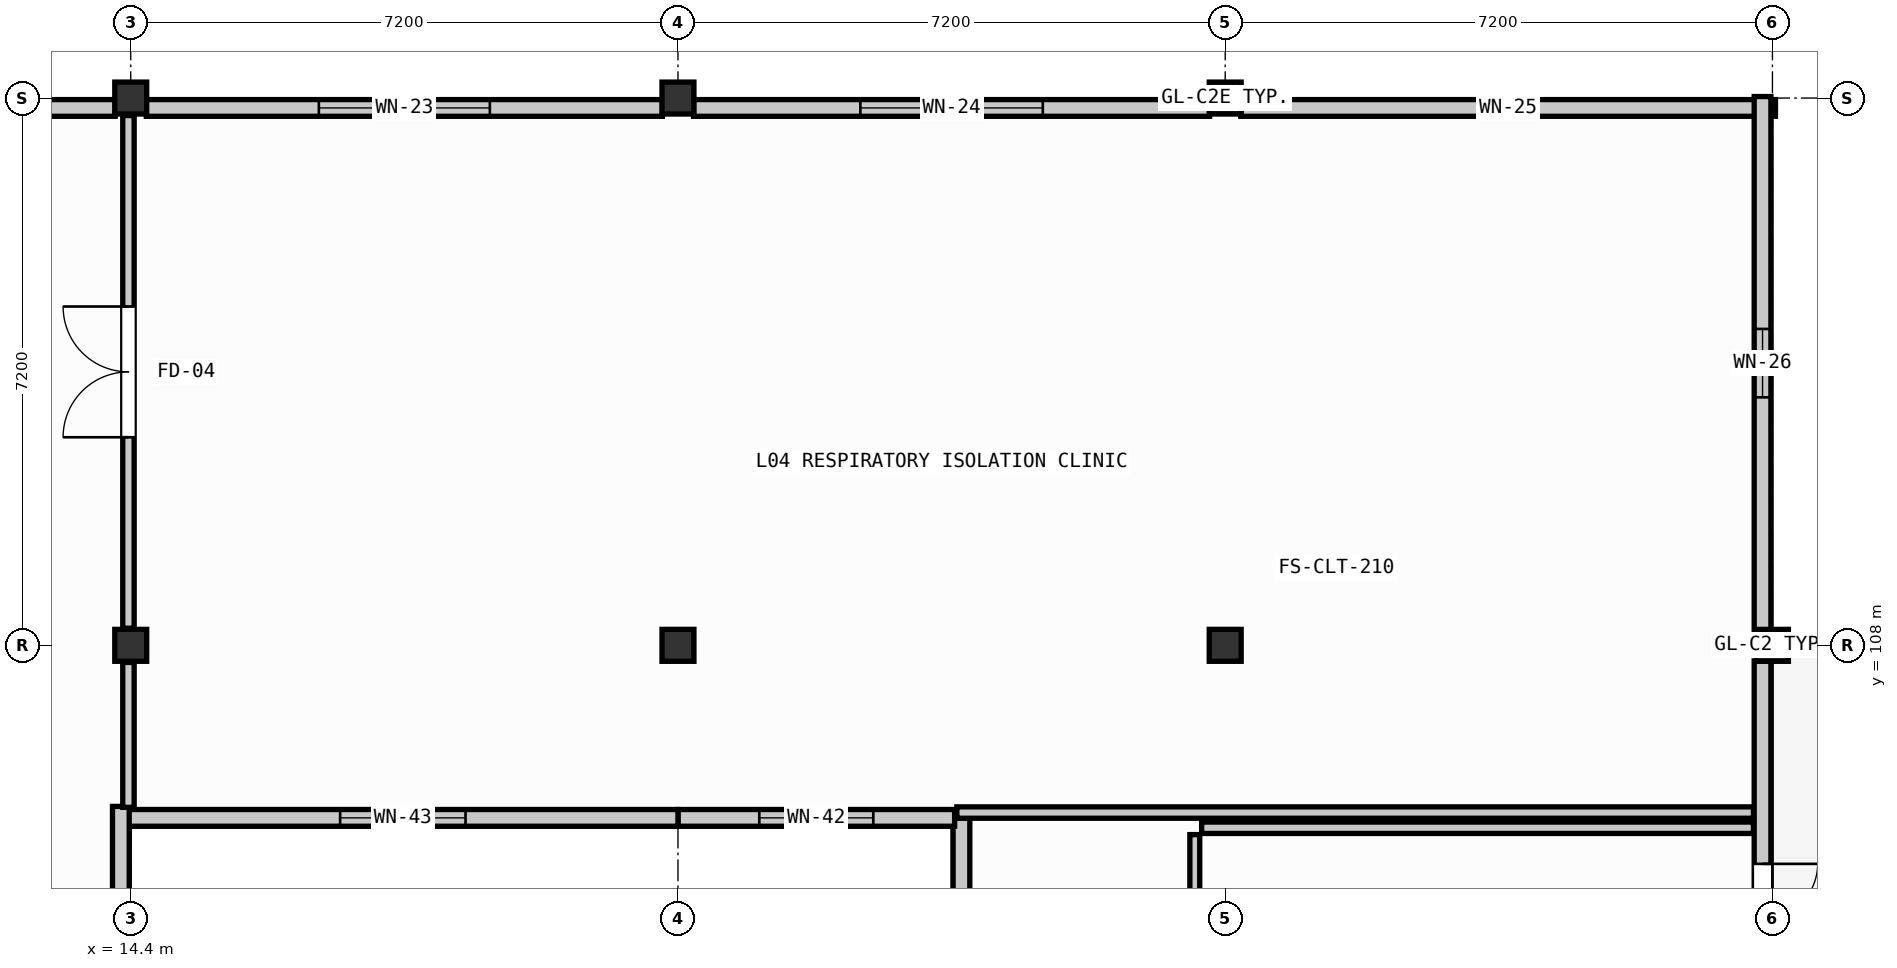
"""IFC4 building model, lengths in metres.
Left out: names, types, materials, properties, quantities, classifications, styles, units other than length and angle.
Written with IfcOpenShell. Run it as: python <this file> out.ifc"""

import sys

from ifc_helpers import new_model, si_unit, direction, frame, frame_2d, origin, origin_2d, place, context, subcontext, project, spatial, rectangle, extrude, element, fill, save


model = new_model("IFC4")
c1 = context("Model", 3, precision=1e-05, world=origin(), true_north=direction((0.0, 1.0)))
c2 = subcontext(c1, "Body", "Model", "MODEL_VIEW")
j1 = project(units=[si_unit("LENGTHUNIT", "METRE"), si_unit("PLANEANGLEUNIT", "RADIAN")], contexts=[c1])
p1 = place(None, origin())
s1 = spatial("IfcSite", under=j1, at=p1, CompositionType="ELEMENT")
p2 = place(p1, origin())
s2 = spatial("IfcBuilding", under=s1, at=p2, CompositionType="ELEMENT")
p3 = place(p2, frame((0.0, 0.0, 13.5)))
s3 = spatial("IfcBuildingStorey", under=s2, at=p3, CompositionType="ELEMENT", Elevation=13.5)
for number, where, z_axis, x_axis in (
    (1, (14.4, 108.0, 0.0), (0.0, 0.0, 1.0), (1.0, 0.0, 0.0)),
    (2, (14.4, 115.2, 0.0), (0.0, 0.0, 1.0), (1.0, 0.0, 0.0)),
    (3, (21.6, 108.0, 0.0), (0.0, 0.0, 1.0), (1.0, 0.0, 0.0)),
    (4, (21.6, 115.2, 0.0), (0.0, 0.0, 1.0), (1.0, 0.0, 0.0)),
    (5, (28.8, 108.0, 0.0), (0.0, 0.0, 1.0), (1.0, 0.0, 0.0)),
    (6, (28.8, 115.2, 0.0), (0.0, 0.0, 1.0), (1.0, 0.0, 0.0)),
):
    element("IfcColumn", number, at=place(p3, frame(where, z_axis=z_axis, x_axis=x_axis)), inside=s3, PredefinedType="COLUMN", context=c2, shape_type="SweptSolid", body=[
        extrude(rectangle(XDim=0.42, YDim=0.42, at=origin_2d()), origin(), (0.0, 0.0, 1.0), 3.99),
    ])
p4 = place(p3, frame((36.0, 108.0, 0.0), z_axis=(0.0, 0.0, 1.0), x_axis=(1.0, 0.0, 0.0)))
e7 = element("IfcColumn", 7, at=p4, inside=s3, PredefinedType="COLUMN", context=c2, shape_type="SweptSolid", body=[
    extrude(rectangle(XDim=0.42, YDim=0.42, at=origin_2d()), origin(), (0.0, 0.0, 1.0), 4.0),
])
p5 = place(p3, frame((7.405, 115.07, 0.0), z_axis=(0.0, 0.0, 1.0), x_axis=(1.0, 0.0, 0.0)))
e8 = element("IfcWall", 8, at=p5, inside=s3, PredefinedType="SOLIDWALL", context=c2, shape_type="SweptSolid", body=[
    extrude(rectangle(XDim=6.79, YDim=0.22, at=frame_2d((3.395, 0.0))), origin(), (0.0, 0.0, 1.0), 3.35),
])
p6 = place(p5, frame((2.345, 0.0, 1.5)))
e9 = element("IfcOpeningElement", 9, at=p6, cuts=e8, PredefinedType="OPENING", context=c2, shape_type="SweptSolid", body=[
    extrude(rectangle(XDim=2.1, YDim=0.95, at=frame_2d((1.05, 0.475))), frame((0.0, 0.12, 0.0), z_axis=(0.0, -1.0, 0.0), x_axis=(1.0, 0.0, 0.0)), (0.0, 0.0, 1.0), 0.24),
])
p7 = place(p3, frame((14.605, 115.07, 0.0), z_axis=(0.0, 0.0, 1.0), x_axis=(1.0, 0.0, 0.0)))
e10 = element("IfcWall", 10, at=p7, inside=s3, PredefinedType="SOLIDWALL", context=c2, shape_type="SweptSolid", body=[
    extrude(rectangle(XDim=6.79, YDim=0.22, at=frame_2d((3.395, 0.0))), origin(), (0.0, 0.0, 1.0), 3.35),
])
p8 = place(p7, frame((2.27, 0.0, 1.5)))
e11 = element("IfcOpeningElement", 11, at=p8, cuts=e10, PredefinedType="OPENING", context=c2, shape_type="SweptSolid", body=[
    extrude(rectangle(XDim=2.25, YDim=0.95, at=frame_2d((1.125, 0.475))), frame((0.0, 0.12, 0.0), z_axis=(0.0, -1.0, 0.0), x_axis=(1.0, 0.0, 0.0)), (0.0, 0.0, 1.0), 0.24),
])
p9 = place(p3, frame((21.805, 115.07, 0.0), z_axis=(0.0, 0.0, 1.0), x_axis=(1.0, 0.0, 0.0)))
e12 = element("IfcWall", 12, at=p9, inside=s3, PredefinedType="SOLIDWALL", context=c2, shape_type="SweptSolid", body=[
    extrude(rectangle(XDim=6.79, YDim=0.22, at=frame_2d((3.395, 0.0))), origin(), (0.0, 0.0, 1.0), 3.35),
])
p10 = place(p9, frame((2.195, 0.0, 1.5)))
e13 = element("IfcOpeningElement", 13, at=p10, cuts=e12, PredefinedType="OPENING", context=c2, shape_type="SweptSolid", body=[
    extrude(rectangle(XDim=2.4, YDim=0.95, at=frame_2d((1.2, 0.475))), frame((0.0, 0.12, 0.0), z_axis=(0.0, -1.0, 0.0), x_axis=(1.0, 0.0, 0.0)), (0.0, 0.0, 1.0), 0.24),
])
p11 = place(p3, frame((29.005, 115.07, 0.0), z_axis=(0.0, 0.0, 1.0), x_axis=(1.0, 0.0, 0.0)))
e14 = element("IfcWall", 14, at=p11, inside=s3, PredefinedType="SOLIDWALL", context=c2, shape_type="SweptSolid", body=[
    extrude(rectangle(XDim=7.035, YDim=0.22, at=frame_2d((3.518, 0.0))), origin(), (0.0, 0.0, 1.0), 3.35),
])
p12 = place(p11, frame((3.143, 0.0, 0.95)))
e15 = element("IfcOpeningElement", 15, at=p12, cuts=e14, PredefinedType="OPENING", context=c2, shape_type="SweptSolid", body=[
    extrude(rectangle(XDim=0.75, YDim=1.25, at=frame_2d((0.375, 0.625))), frame((0.0, 0.12, 0.0), z_axis=(0.0, -1.0, 0.0), x_axis=(1.0, 0.0, 0.0)), (0.0, 0.0, 1.0), 0.24),
])
p13 = place(p3, frame((35.87, 115.22, 0.0), z_axis=(0.0, 0.0, 1.0), x_axis=(0.0, -1.0, 0.0)))
e16 = element("IfcWall", 16, at=p13, inside=s3, PredefinedType="SOLIDWALL", context=c2, shape_type="SweptSolid", body=[
    extrude(rectangle(XDim=7.015, YDim=0.22, at=frame_2d((3.507, 0.0))), origin(), (0.0, 0.0, 1.0), 3.03),
])
p14 = place(p13, frame((3.058, 0.0, 0.95)))
e17 = element("IfcOpeningElement", 17, at=p14, cuts=e16, PredefinedType="OPENING", context=c2, shape_type="SweptSolid", body=[
    extrude(rectangle(XDim=0.9, YDim=1.25, at=frame_2d((0.45, 0.625))), frame((0.0, 0.12, 0.0), z_axis=(0.0, -1.0, 0.0), x_axis=(1.0, 0.0, 0.0)), (0.0, 0.0, 1.0), 0.24),
])
p15 = place(p3, frame((35.87, 107.795, 0.0), z_axis=(0.0, 0.0, 1.0), x_axis=(0.0, -1.0, 0.0)))
e18 = element("IfcWall", 18, at=p15, inside=s3, PredefinedType="SOLIDWALL", context=c2, shape_type="SweptSolid", body=[
    extrude(rectangle(XDim=6.79, YDim=0.22, at=frame_2d((3.395, 0.0))), origin(), (0.0, 0.0, 1.0), 3.03),
])
p16 = place(p15, frame((2.67, 0.0, 0.0)))
e19 = element("IfcOpeningElement", 19, at=p16, cuts=e18, PredefinedType="OPENING", context=c2, shape_type="SweptSolid", body=[
    extrude(rectangle(XDim=1.45, YDim=2.25, at=frame_2d((0.725, 1.125))), frame((0.0, 0.12, 0.0), z_axis=(0.0, -1.0, 0.0), x_axis=(1.0, 0.0, 0.0)), (0.0, 0.0, 1.0), 0.24),
])
p17 = place(p3, frame((25.33, 100.8, 0.0), z_axis=(0.0, 0.0, 1.0), x_axis=(0.0, 1.0, 0.0)))
e20 = element("IfcWall", 20, at=p17, inside=s3, PredefinedType="SOLIDWALL", context=c2, shape_type="SweptSolid", body=[
    extrude(rectangle(XDim=4.931, YDim=0.22, at=frame_2d((2.465, 0.0))), origin(), (0.0, 0.0, 1.0), 3.97),
])
p18 = place(p17, frame((1.735, 0.0, 0.95)))
e21 = element("IfcOpeningElement", 21, at=p18, cuts=e20, PredefinedType="OPENING", context=c2, shape_type="SweptSolid", body=[
    extrude(rectangle(XDim=1.35, YDim=1.55, at=frame_2d((0.675, 0.775))), frame((0.0, 0.12, 0.0), z_axis=(0.0, -1.0, 0.0), x_axis=(1.0, 0.0, 0.0)), (0.0, 0.0, 1.0), 0.24),
])
p19 = place(p3, frame((25.24, 105.73, 0.0), z_axis=(0.0, 0.0, 1.0), x_axis=(-1.0, 0.0, 0.0)))
e22 = element("IfcWall", 22, at=p19, inside=s3, PredefinedType="SOLIDWALL", context=c2, shape_type="SweptSolid", body=[
    extrude(rectangle(XDim=3.64, YDim=0.22, at=frame_2d((1.82, 0.0))), origin(), (0.0, 0.0, 1.0), 3.97),
])
p20 = place(p19, frame((1.07, 0.0, 0.95)))
e23 = element("IfcOpeningElement", 23, at=p20, cuts=e22, PredefinedType="OPENING", context=c2, shape_type="SweptSolid", body=[
    extrude(rectangle(XDim=1.5, YDim=1.55, at=frame_2d((0.75, 0.775))), frame((0.0, 0.12, 0.0), z_axis=(0.0, -1.0, 0.0), x_axis=(1.0, 0.0, 0.0)), (0.0, 0.0, 1.0), 0.24),
])
p21 = place(p3, frame((21.6, 105.73, 0.0), z_axis=(0.0, 0.0, 1.0), x_axis=(-1.0, 0.0, 0.0)))
e24 = element("IfcWall", 24, at=p21, inside=s3, PredefinedType="SOLIDWALL", context=c2, shape_type="SweptSolid", body=[
    extrude(rectangle(XDim=7.24, YDim=0.22, at=frame_2d((3.62, 0.0))), origin(), (0.0, 0.0, 1.0), 3.35),
])
p22 = place(p21, frame((2.795, 0.0, 0.95)))
e25 = element("IfcOpeningElement", 25, at=p22, cuts=e24, PredefinedType="OPENING", context=c2, shape_type="SweptSolid", body=[
    extrude(rectangle(XDim=1.65, YDim=1.55, at=frame_2d((0.825, 0.775))), frame((0.0, 0.12, 0.0), z_axis=(0.0, -1.0, 0.0), x_axis=(1.0, 0.0, 0.0)), (0.0, 0.0, 1.0), 0.24),
])
p23 = place(p3, frame((14.27, 105.881, 0.0), z_axis=(0.0, 0.0, 1.0), x_axis=(0.0, -1.0, 0.0)))
e26 = element("IfcWall", 26, at=p23, inside=s3, PredefinedType="SOLIDWALL", context=c2, shape_type="SweptSolid", body=[
    extrude(rectangle(XDim=4.876, YDim=0.22, at=frame_2d((2.438, 0.0))), origin(), (0.0, 0.0, 1.0), 3.27),
])
p24 = place(p23, frame((2.743, 0.0, 0.95)))
e27 = element("IfcOpeningElement", 27, at=p24, cuts=e26, PredefinedType="OPENING", context=c2, shape_type="SweptSolid", body=[
    extrude(rectangle(XDim=0.75, YDim=1.85, at=frame_2d((0.375, 0.925))), frame((0.0, 0.12, 0.0), z_axis=(0.0, -1.0, 0.0), x_axis=(1.0, 0.0, 0.0)), (0.0, 0.0, 1.0), 0.24),
])
p25 = place(p3, frame((28.49, 105.6, 0.0), z_axis=(0.0, 0.0, 1.0), x_axis=(1.0, 0.0, 0.0)))
e28 = element("IfcWall", 28, at=p25, inside=s3, PredefinedType="PARTITIONING", context=c2, shape_type="SweptSolid", body=[
    extrude(rectangle(XDim=7.26, YDim=0.15, at=frame_2d((3.63, 0.0))), origin(), (0.0, 0.0, 1.0), 3.35),
])
p26 = place(p3, frame((28.402, 88.092, 0.0), z_axis=(0.0, 0.0, 1.0), x_axis=(-0.00012614936, 0.999999992043, 0.0)))
e29 = element("IfcWall", 29, at=p26, inside=s3, PredefinedType="PARTITIONING", context=c2, shape_type="SweptSolid", body=[
    extrude(rectangle(XDim=17.418, YDim=0.13, at=frame_2d((8.709, 0.0))), origin(), (0.0, 0.0, 1.0), 3.97),
])
p27 = place(p3, frame((35.75, 105.8, 0.0), z_axis=(0.0, 0.0, 1.0), x_axis=(-1.0, 0.0, 0.0)))
e30 = element("IfcWall", 30, at=p27, inside=s3, PredefinedType="PARTITIONING", context=c2, shape_type="SweptSolid", body=[
    extrude(rectangle(XDim=10.481, YDim=0.15, at=frame_2d((5.24, 0.0))), origin(), (0.0, 0.0, 1.0), 3.35),
])
p28 = place(p3, frame((14.37, 105.868, 0.0), z_axis=(0.0, 0.0, 1.0), x_axis=(0.0, 1.0, 0.0)))
e31 = element("IfcWall", 31, at=p28, inside=s3, PredefinedType="PARTITIONING", context=c2, shape_type="SweptSolid", body=[
    extrude(rectangle(XDim=1.906, YDim=0.15, at=frame_2d((0.953, 0.0))), origin(), (0.0, 0.0, 1.0), 3.27),
])
p29 = place(p3, frame((14.37, 108.225, 0.0), z_axis=(0.0, 0.0, 1.0), x_axis=(0.0, 1.0, 0.0)))
e32 = element("IfcWall", 32, at=p29, inside=s3, PredefinedType="PARTITIONING", context=c2, shape_type="SweptSolid", body=[
    extrude(rectangle(XDim=6.745, YDim=0.15, at=frame_2d((3.373, 0.0))), origin(), (0.0, 0.0, 1.0), 3.27),
])
p30 = place(p29, frame((2.512, 0.0, 0.0)))
e33 = element("IfcOpeningElement", 33, at=p30, cuts=e32, PredefinedType="OPENING", context=c2, shape_type="SweptSolid", body=[
    extrude(rectangle(XDim=1.72, YDim=2.26, at=frame_2d((0.86, 1.13))), frame((0.0, 0.085, 0.0), z_axis=(0.0, -1.0, 0.0), x_axis=(1.0, 0.0, 0.0)), (0.0, 0.0, 1.0), 0.17),
])
p31 = place(p8, origin())
e34 = element("IfcWindow", 34, at=p31, inside=s3, PartitioningType="SINGLE_PANEL", PredefinedType="WINDOW", context=c2, shape_type="SweptSolid", body=[
    extrude(rectangle(XDim=2.25, YDim=0.95, at=frame_2d((1.125, 0.475))), frame((0.0, 0.03, 0.0), z_axis=(0.0, -1.0, 0.0), x_axis=(1.0, 0.0, 0.0)), (0.0, 0.0, 1.0), 0.06),
])
fill(e11, e34)
p32 = place(p10, origin())
e35 = element("IfcWindow", 35, at=p32, inside=s3, PartitioningType="SINGLE_PANEL", PredefinedType="WINDOW", context=c2, shape_type="SweptSolid", body=[
    extrude(rectangle(XDim=2.4, YDim=0.95, at=frame_2d((1.2, 0.475))), frame((0.0, 0.03, 0.0), z_axis=(0.0, -1.0, 0.0), x_axis=(1.0, 0.0, 0.0)), (0.0, 0.0, 1.0), 0.06),
])
fill(e13, e35)
p33 = place(p12, origin())
e36 = element("IfcWindow", 36, at=p33, inside=s3, PartitioningType="SINGLE_PANEL", PredefinedType="WINDOW", context=c2, shape_type="SweptSolid", body=[
    extrude(rectangle(XDim=0.75, YDim=1.25, at=frame_2d((0.375, 0.625))), frame((0.0, 0.03, 0.0), z_axis=(0.0, -1.0, 0.0), x_axis=(1.0, 0.0, 0.0)), (0.0, 0.0, 1.0), 0.06),
])
fill(e15, e36)
p34 = place(p14, origin())
e37 = element("IfcWindow", 37, at=p34, inside=s3, PartitioningType="SINGLE_PANEL", PredefinedType="WINDOW", context=c2, shape_type="SweptSolid", body=[
    extrude(rectangle(XDim=0.9, YDim=1.25, at=frame_2d((0.45, 0.625))), frame((0.0, 0.03, 0.0), z_axis=(0.0, -1.0, 0.0), x_axis=(1.0, 0.0, 0.0)), (0.0, 0.0, 1.0), 0.06),
])
fill(e17, e37)
p35 = place(p16, origin())
e38 = element("IfcDoor", 38, at=p35, inside=s3, OperationType="DOUBLE_DOOR_SINGLE_SWING", PredefinedType="DOOR", context=c2, shape_type="SweptSolid", body=[
    extrude(rectangle(XDim=1.45, YDim=2.25, at=frame_2d((0.725, 1.125))), frame((0.0, 0.025, 0.0), z_axis=(0.0, -1.0, 0.0), x_axis=(1.0, 0.0, 0.0)), (0.0, 0.0, 1.0), 0.05),
])
fill(e19, e38)
p36 = place(p20, origin())
e39 = element("IfcWindow", 39, at=p36, inside=s3, PartitioningType="SINGLE_PANEL", PredefinedType="WINDOW", context=c2, shape_type="SweptSolid", body=[
    extrude(rectangle(XDim=1.5, YDim=1.55, at=frame_2d((0.75, 0.775))), frame((0.0, 0.03, 0.0), z_axis=(0.0, -1.0, 0.0), x_axis=(1.0, 0.0, 0.0)), (0.0, 0.0, 1.0), 0.06),
])
fill(e23, e39)
p37 = place(p22, origin())
e40 = element("IfcWindow", 40, at=p37, inside=s3, PartitioningType="SINGLE_PANEL", PredefinedType="WINDOW", context=c2, shape_type="SweptSolid", body=[
    extrude(rectangle(XDim=1.65, YDim=1.55, at=frame_2d((0.825, 0.775))), frame((0.0, 0.03, 0.0), z_axis=(0.0, -1.0, 0.0), x_axis=(1.0, 0.0, 0.0)), (0.0, 0.0, 1.0), 0.06),
])
fill(e25, e40)
p38 = place(p30, origin())
e41 = element("IfcDoor", 41, at=p38, inside=s3, OperationType="DOUBLE_DOOR_SINGLE_SWING", PredefinedType="DOOR", context=c2, shape_type="SweptSolid", body=[
    extrude(rectangle(XDim=1.72, YDim=2.26, at=frame_2d((0.86, 1.13))), frame((0.0, 0.025, 0.0), z_axis=(0.0, -1.0, 0.0), x_axis=(1.0, 0.0, 0.0)), (0.0, 0.0, 1.0), 0.05),
])
fill(e33, e41)
save(model, sys.argv[1])
